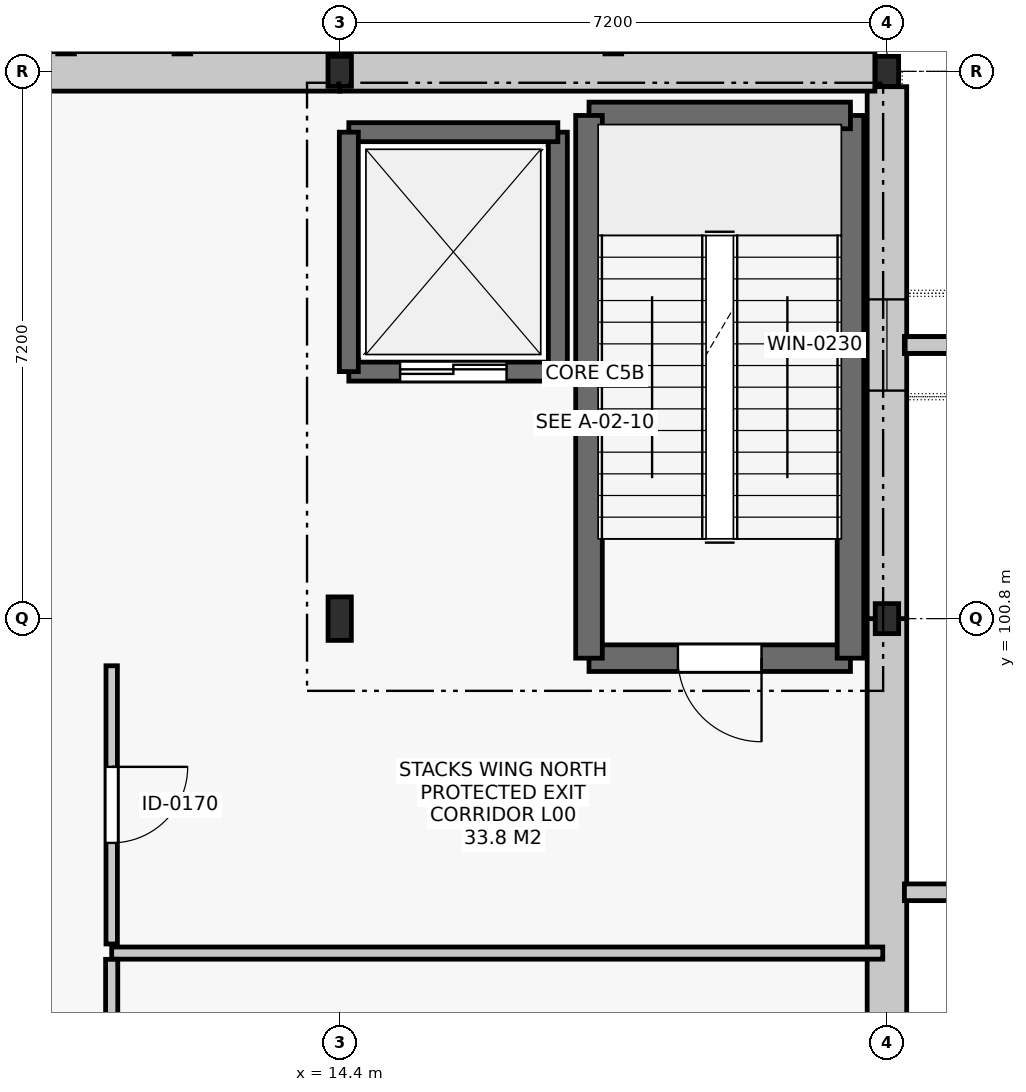
"""IFC4 building model, lengths in metres.
Left out: names, types, materials, properties, quantities, classifications, styles, units other than length and angle.
Written with IfcOpenShell. Run it as: python <this file> out.ifc"""

import sys

from ifc_helpers import new_model, si_unit, direction, frame, frame_2d, origin, origin_2d, place, context, subcontext, project, spatial, rectangle, i_section, extrude, element, fill, save


model = new_model("IFC4")
c1 = context("Model", 3, precision=1e-05, world=origin(), true_north=direction((0.0, 1.0)))
c2 = subcontext(c1, "Body", "Model", "MODEL_VIEW")
j1 = project(units=[si_unit("LENGTHUNIT", "METRE"), si_unit("PLANEANGLEUNIT", "RADIAN")], contexts=[c1])
p1 = place(None, origin())
s1 = spatial("IfcSite", under=j1, at=p1, CompositionType="ELEMENT")
p2 = place(p1, origin())
s2 = spatial("IfcBuilding", under=s1, at=p2, CompositionType="ELEMENT")
p3 = place(p2, origin())
s3 = spatial("IfcBuildingStorey", under=s2, at=p3, CompositionType="ELEMENT", Elevation=0.0)
p4 = place(p3, frame((14.4, 100.8, 0.0), z_axis=(0.0, 0.0, 1.0), x_axis=(1.0, 0.0, 0.0)))
e1 = element("IfcColumn", 1, at=p4, inside=s3, PredefinedType="COLUMN", context=c2, shape_type="SweptSolid", body=[
    extrude(i_section(OverallWidth=0.306, OverallDepth=0.572, WebThickness=0.021, FlangeThickness=0.04, FilletRadius=0.027, at=origin_2d()), origin(), (0.0, 0.0, 1.0), 5.4),
])
for number, where, z_axis, x_axis in (
    (2, (14.4, 108.0, 0.0), (0.0, 0.0, 1.0), (1.0, 0.0, 0.0)),
    (3, (21.6, 100.8, 0.0), (0.0, 0.0, 1.0), (1.0, 0.0, 0.0)),
    (4, (21.6, 108.0, 0.0), (0.0, 0.0, 1.0), (1.0, 0.0, 0.0)),
):
    element("IfcColumn", number, at=place(p3, frame(where, z_axis=z_axis, x_axis=x_axis)), inside=s3, PredefinedType="COLUMN", context=c2, shape_type="SweptSolid", body=[
        extrude(i_section(OverallWidth=0.308, OverallDepth=0.395, WebThickness=0.021, FlangeThickness=0.036, FilletRadius=0.027, at=origin_2d()), origin(), (0.0, 0.0, 1.0), 5.4),
    ])
p5 = place(p3, frame((21.6, 93.6, 0.0), z_axis=(0.0, 0.0, 1.0), x_axis=(0.0, 1.0, 0.0)))
e5 = element("IfcWall", 5, at=p5, inside=s3, PredefinedType="SOLIDWALL", context=c2, shape_type="SweptSolid", body=[
    extrude(rectangle(XDim=7.2, YDim=0.52, at=frame_2d((3.6, 0.0))), origin(), (0.0, 0.0, 1.0), 4.38),
])
p6 = place(p3, frame((21.6, 100.8, 0.0), z_axis=(0.0, 0.0, 1.0), x_axis=(0.0, 1.0, 0.0)))
e6 = element("IfcWall", 6, at=p6, inside=s3, PredefinedType="SOLIDWALL", context=c2, shape_type="SweptSolid", body=[
    extrude(rectangle(XDim=6.999, YDim=0.52, at=frame_2d((3.499, 0.0))), origin(), (0.0, 0.0, 1.0), 4.38),
])
p7 = place(p6, frame((3.0, 0.0, 0.95)))
e7 = element("IfcOpeningElement", 7, at=p7, cuts=e6, PredefinedType="OPENING", context=c2, shape_type="SweptSolid", body=[
    extrude(rectangle(XDim=1.2, YDim=2.15, at=frame_2d((0.6, 1.075))), frame((0.0, 0.272, 0.0), z_axis=(0.0, -1.0, 0.0), x_axis=(1.0, 0.0, 0.0)), (0.0, 0.0, 1.0), 0.544),
])
p8 = place(p3, frame((21.442, 108.0, 0.0), z_axis=(0.0, 0.0, 1.0), x_axis=(-1.0, 0.0, 0.0)))
e8 = element("IfcWall", 8, at=p8, inside=s3, PredefinedType="SOLIDWALL", context=c2, shape_type="SweptSolid", body=[
    extrude(rectangle(XDim=7.042, YDim=0.52, at=frame_2d((3.521, 0.0))), origin(), (0.0, 0.0, 1.0), 4.38),
])
p9 = place(p3, frame((14.4, 108.0, 0.0), z_axis=(0.0, 0.0, 1.0), x_axis=(-1.0, 0.0, 0.0)))
e9 = element("IfcWall", 9, at=p9, inside=s3, PredefinedType="SOLIDWALL", context=c2, shape_type="SweptSolid", body=[
    extrude(rectangle(XDim=7.2, YDim=0.52, at=frame_2d((3.6, 0.0))), origin(), (0.0, 0.0, 1.0), 4.38),
])
p10 = place(p9, frame((4.2, 0.0, 0.0)))
e10 = element("IfcOpeningElement", 10, at=p10, cuts=e9, PredefinedType="OPENING", context=c2, shape_type="SweptSolid", body=[
    extrude(rectangle(XDim=1.8, YDim=2.2, at=frame_2d((0.9, 1.1))), frame((0.0, 0.272, 0.0), z_axis=(0.0, -1.0, 0.0), x_axis=(1.0, 0.0, 0.0)), (0.0, 0.0, 1.0), 0.544),
])
p11 = place(p3, frame((17.68, 100.28, 0.0), z_axis=(0.0, 0.0, 1.0), x_axis=(1.0, 0.0, 0.0)))
e11 = element("IfcWall", 11, at=p11, inside=s3, PredefinedType="SHEAR", context=c2, shape_type="SweptSolid", body=[
    extrude(rectangle(XDim=3.44, YDim=0.35, at=frame_2d((1.72, 0.0))), origin(), (0.0, 0.0, 1.0), 5.1),
])
p12 = place(p11, frame((1.17, 0.0, 0.0)))
e12 = element("IfcOpeningElement", 12, at=p12, cuts=e11, PredefinedType="OPENING", context=c2, shape_type="SweptSolid", body=[
    extrude(rectangle(XDim=1.1, YDim=2.15, at=frame_2d((0.55, 1.075))), frame((0.0, 0.187, 0.0), z_axis=(0.0, -1.0, 0.0), x_axis=(1.0, 0.0, 0.0)), (0.0, 0.0, 1.0), 0.374),
])
p13 = place(p3, frame((21.12, 100.28, 0.0), z_axis=(0.0, 0.0, 1.0), x_axis=(0.0, 1.0, 0.0)))
e13 = element("IfcWall", 13, at=p13, inside=s3, PredefinedType="SHEAR", context=c2, shape_type="SweptSolid", body=[
    extrude(rectangle(XDim=7.14, YDim=0.35, at=frame_2d((3.57, 0.0))), origin(), (0.0, 0.0, 1.0), 5.1),
])
p14 = place(p3, frame((21.12, 107.42, 0.0), z_axis=(0.0, 0.0, 1.0), x_axis=(-1.0, 0.0, 0.0)))
e14 = element("IfcWall", 14, at=p14, inside=s3, PredefinedType="SHEAR", context=c2, shape_type="SweptSolid", body=[
    extrude(rectangle(XDim=3.44, YDim=0.35, at=frame_2d((1.72, 0.0))), origin(), (0.0, 0.0, 1.0), 5.1),
])
p15 = place(p3, frame((17.68, 107.42, 0.0), z_axis=(0.0, 0.0, 1.0), x_axis=(0.0, -1.0, 0.0)))
e15 = element("IfcWall", 15, at=p15, inside=s3, PredefinedType="SHEAR", context=c2, shape_type="SweptSolid", body=[
    extrude(rectangle(XDim=7.14, YDim=0.35, at=frame_2d((3.57, 0.0))), origin(), (0.0, 0.0, 1.0), 5.1),
])
p16 = place(p3, frame((14.52, 104.05, 0.0), z_axis=(0.0, 0.0, 1.0), x_axis=(1.0, 0.0, 0.0)))
e16 = element("IfcWall", 16, at=p16, inside=s3, PredefinedType="SHEAR", context=c2, shape_type="SweptSolid", body=[
    extrude(rectangle(XDim=2.75, YDim=0.25, at=frame_2d((1.375, 0.0))), origin(), (0.0, 0.0, 1.0), 5.1),
])
p17 = place(p16, frame((0.675, 0.0, 0.0)))
e17 = element("IfcOpeningElement", 17, at=p17, cuts=e16, PredefinedType="OPENING", context=c2, shape_type="SweptSolid", body=[
    extrude(rectangle(XDim=1.4, YDim=2.2, at=frame_2d((0.7, 1.1))), frame((0.0, 0.137, 0.0), z_axis=(0.0, -1.0, 0.0), x_axis=(1.0, 0.0, 0.0)), (0.0, 0.0, 1.0), 0.274),
])
p18 = place(p3, frame((17.27, 104.05, 0.0), z_axis=(0.0, 0.0, 1.0), x_axis=(0.0, 1.0, 0.0)))
e18 = element("IfcWall", 18, at=p18, inside=s3, PredefinedType="SHEAR", context=c2, shape_type="SweptSolid", body=[
    extrude(rectangle(XDim=3.15, YDim=0.25, at=frame_2d((1.575, 0.0))), origin(), (0.0, 0.0, 1.0), 5.1),
])
p19 = place(p3, frame((17.27, 107.2, 0.0), z_axis=(0.0, 0.0, 1.0), x_axis=(-1.0, 0.0, 0.0)))
e19 = element("IfcWall", 19, at=p19, inside=s3, PredefinedType="SHEAR", context=c2, shape_type="SweptSolid", body=[
    extrude(rectangle(XDim=2.75, YDim=0.25, at=frame_2d((1.375, 0.0))), origin(), (0.0, 0.0, 1.0), 5.1),
])
p20 = place(p3, frame((14.52, 107.2, 0.0), z_axis=(0.0, 0.0, 1.0), x_axis=(0.0, -1.0, 0.0)))
e20 = element("IfcWall", 20, at=p20, inside=s3, PredefinedType="SHEAR", context=c2, shape_type="SweptSolid", body=[
    extrude(rectangle(XDim=3.15, YDim=0.25, at=frame_2d((1.575, 0.0))), origin(), (0.0, 0.0, 1.0), 5.1),
])
p21 = place(p3, frame((11.4, 96.4, 0.0), z_axis=(0.0, 0.0, 1.0), x_axis=(1.0, 0.0, 0.0)))
e21 = element("IfcWall", 21, at=p21, inside=s3, PredefinedType="PARTITIONING", context=c2, shape_type="SweptSolid", body=[
    extrude(rectangle(XDim=10.145, YDim=0.16, at=frame_2d((5.073, 0.0))), origin(), (0.0, 0.0, 1.0), 4.485),
])
p22 = place(p3, frame((11.4, 72.082, 0.0), z_axis=(0.0, 0.0, 1.0), x_axis=(0.0, 1.0, 0.0)))
e22 = element("IfcWall", 22, at=p22, inside=s3, PredefinedType="PARTITIONING", context=c2, shape_type="SweptSolid", body=[
    extrude(rectangle(XDim=24.236, YDim=0.16, at=frame_2d((12.118, 0.0))), origin(), (0.0, 0.0, 1.0), 4.485),
])
p23 = place(p22, frame((11.618, 0.0, 0.0)))
e23 = element("IfcOpeningElement", 23, at=p23, cuts=e22, PredefinedType="OPENING", context=c2, shape_type="SweptSolid", body=[
    extrude(rectangle(XDim=1.0, YDim=2.15, at=frame_2d((0.5, 1.075))), frame((0.0, 0.092, 0.0), z_axis=(0.0, -1.0, 0.0), x_axis=(1.0, 0.0, 0.0)), (0.0, 0.0, 1.0), 0.184),
])
p24 = place(p3, frame((11.4, 96.52, 0.0), z_axis=(0.0, 0.0, 1.0), x_axis=(0.0, 1.0, 0.0)))
e24 = element("IfcWall", 24, at=p24, inside=s3, PredefinedType="PARTITIONING", context=c2, shape_type="SweptSolid", body=[
    extrude(rectangle(XDim=3.66, YDim=0.15, at=frame_2d((1.83, 0.0))), origin(), (0.0, 0.0, 1.0), 5.085),
])
p25 = place(p24, frame((1.33, 0.0, 0.0)))
e25 = element("IfcOpeningElement", 25, at=p25, cuts=e24, PredefinedType="OPENING", context=c2, shape_type="SweptSolid", body=[
    extrude(rectangle(XDim=1.0, YDim=2.15, at=frame_2d((0.5, 1.075))), frame((0.0, 0.087, 0.0), z_axis=(0.0, -1.0, 0.0), x_axis=(1.0, 0.0, 0.0)), (0.0, 0.0, 1.0), 0.174),
])
p26 = place(p7, origin())
e26 = element("IfcWindow", 26, at=p26, inside=s3, PartitioningType="SINGLE_PANEL", PredefinedType="WINDOW", context=c2, shape_type="SweptSolid", body=[
    extrude(rectangle(XDim=1.2, YDim=2.15, at=frame_2d((0.6, 1.075))), frame((0.0, 0.03, 0.0), z_axis=(0.0, -1.0, 0.0), x_axis=(1.0, 0.0, 0.0)), (0.0, 0.0, 1.0), 0.06),
])
fill(e7, e26)
p27 = place(p12, frame((1.1, 0.0, 0.0), z_axis=(0.0, 0.0, 1.0), x_axis=(-1.0, 0.0, 0.0)))
e27 = element("IfcDoor", 27, at=p27, inside=s3, OperationType="SINGLE_SWING_LEFT", PredefinedType="DOOR", context=c2, shape_type="SweptSolid", body=[
    extrude(rectangle(XDim=1.1, YDim=2.15, at=frame_2d((0.55, 1.075))), frame((0.0, 0.025, 0.0), z_axis=(0.0, -1.0, 0.0), x_axis=(1.0, 0.0, 0.0)), (0.0, 0.0, 1.0), 0.05),
])
fill(e12, e27)
p28 = place(p17, origin())
e28 = element("IfcDoor", 28, at=p28, inside=s3, OperationType="DOUBLE_DOOR_SLIDING", PredefinedType="DOOR", context=c2, shape_type="SweptSolid", body=[
    extrude(rectangle(XDim=1.4, YDim=2.2, at=frame_2d((0.7, 1.1))), frame((0.0, 0.025, 0.0), z_axis=(0.0, -1.0, 0.0), x_axis=(1.0, 0.0, 0.0)), (0.0, 0.0, 1.0), 0.05),
])
fill(e17, e28)
p29 = place(p25, frame((1.0, 0.0, 0.0), z_axis=(0.0, 0.0, 1.0), x_axis=(-1.0, 0.0, 0.0)))
e29 = element("IfcDoor", 29, at=p29, inside=s3, OperationType="SINGLE_SWING_LEFT", PredefinedType="DOOR", context=c2, shape_type="SweptSolid", body=[
    extrude(rectangle(XDim=1.0, YDim=2.15, at=frame_2d((0.5, 1.075))), frame((0.0, 0.025, 0.0), z_axis=(0.0, -1.0, 0.0), x_axis=(1.0, 0.0, 0.0)), (0.0, 0.0, 1.0), 0.05),
])
fill(e25, e29)
save(model, sys.argv[1])
